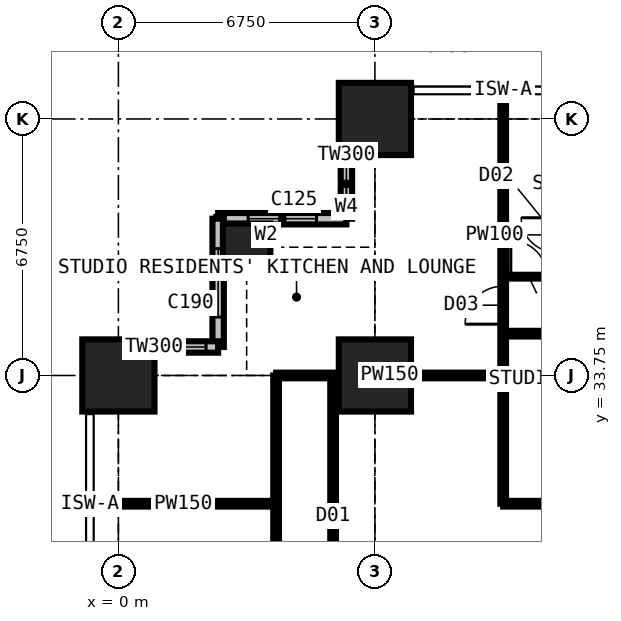
"""IFC4 building model, lengths in metres.
Left out: names, types, materials, properties, quantities, classifications, styles, units other than length and angle.
Written with IfcOpenShell. Run it as: python <this file> out.ifc"""

import sys

from ifc_helpers import new_model, si_unit, direction, frame, frame_2d, origin, origin_2d, place, context, subcontext, project, spatial, rectangle, extrude, element, fill, save


model = new_model("IFC4")
c1 = context("Model", 3, precision=1e-05, world=origin(), true_north=direction((0.0, 1.0)))
c2 = subcontext(c1, "Body", "Model", "MODEL_VIEW")
j1 = project(units=[si_unit("LENGTHUNIT", "METRE"), si_unit("PLANEANGLEUNIT", "RADIAN")], contexts=[c1])
p1 = place(None, origin())
s1 = spatial("IfcSite", under=j1, at=p1, CompositionType="ELEMENT")
p2 = place(p1, origin())
s2 = spatial("IfcBuilding", under=s1, at=p2, CompositionType="ELEMENT")
p3 = place(p2, frame((0.0, 0.0, 39.6)))
s3 = spatial("IfcBuildingStorey", under=s2, at=p3, CompositionType="ELEMENT", Elevation=39.6)
p4 = place(p3, frame((0.0, 33.75, 0.0), z_axis=(0.0, 0.0, 1.0), x_axis=(1.0, 0.0, 0.0)))
e1 = element("IfcColumn", 1, at=p4, inside=s3, PredefinedType="COLUMN", context=c2, shape_type="SweptSolid", body=[
    extrude(rectangle(XDim=1.9, YDim=1.9, at=origin_2d()), origin(), (0.0, 0.0, 1.0), 3.6),
])
p5 = place(p3, frame((3.375, 37.125, 0.0), z_axis=(0.0, 0.0, 1.0), x_axis=(1.0, 0.0, 0.0)))
e2 = element("IfcColumn", 2, at=p5, inside=s3, PredefinedType="COLUMN", context=c2, shape_type="SweptSolid", body=[
    extrude(rectangle(XDim=1.25, YDim=1.25, at=origin_2d()), origin(), (0.0, 0.0, 1.0), 3.6),
])
for number, where, z_axis, x_axis in (
    (3, (6.75, 33.75, 0.0), (0.0, 0.0, 1.0), (1.0, 0.0, 0.0)),
    (4, (6.75, 40.5, 0.0), (0.0, 0.0, 1.0), (1.0, 0.0, 0.0)),
):
    element("IfcColumn", number, at=place(p3, frame(where, z_axis=z_axis, x_axis=x_axis)), inside=s3, PredefinedType="COLUMN", context=c2, shape_type="SweptSolid", body=[
        extrude(rectangle(XDim=1.9, YDim=1.9, at=origin_2d()), origin(), (0.0, 0.0, 1.0), 3.6),
    ])
p6 = place(p3, frame((6.0, 41.25, 0.0), z_axis=(0.0, 0.0, 1.0), x_axis=(0.0, -1.0, 0.0)))
e5 = element("IfcWall", 5, at=p6, inside=s3, PredefinedType="SOLIDWALL", context=c2, shape_type="SweptSolid", body=[
    extrude(rectangle(XDim=3.375, YDim=0.3, at=frame_2d((1.688, 0.0))), origin(), (0.0, 0.0, 1.0), 3.375),
])
p7 = place(p6, frame((1.857, 0.0, 0.9)))
e6 = element("IfcOpeningElement", 6, at=p7, cuts=e5, PredefinedType="OPENING", context=c2, shape_type="SweptSolid", body=[
    extrude(rectangle(XDim=1.2, YDim=1.8, at=frame_2d((0.6, 0.9))), frame((0.0, 0.16, 0.0), z_axis=(0.0, -1.0, 0.0), x_axis=(1.0, 0.0, 0.0)), (0.0, 0.0, 1.0), 0.32),
])
p8 = place(p3, frame((6.0, 37.875, 0.0), z_axis=(0.0, 0.0, 1.0), x_axis=(-1.0, 0.0, 0.0)))
e7 = element("IfcWall", 7, at=p8, inside=s3, PredefinedType="SOLIDWALL", context=c2, shape_type="SweptSolid", body=[
    extrude(rectangle(XDim=3.375, YDim=0.3, at=frame_2d((1.688, 0.0))), origin(), (0.0, 0.0, 1.0), 3.375),
])
p9 = place(p8, frame((0.788, 0.0, 0.6)))
e8 = element("IfcOpeningElement", 8, at=p9, cuts=e7, PredefinedType="OPENING", context=c2, shape_type="SweptSolid", body=[
    extrude(rectangle(XDim=1.8, YDim=2.1, at=frame_2d((0.9, 1.05))), frame((0.0, 0.16, 0.0), z_axis=(0.0, -1.0, 0.0), x_axis=(1.0, 0.0, 0.0)), (0.0, 0.0, 1.0), 0.32),
])
p10 = place(p3, frame((2.625, 37.875, 0.0), z_axis=(0.0, 0.0, 1.0), x_axis=(0.0, -1.0, 0.0)))
e9 = element("IfcWall", 9, at=p10, inside=s3, PredefinedType="SOLIDWALL", context=c2, shape_type="SweptSolid", body=[
    extrude(rectangle(XDim=3.375, YDim=0.3, at=frame_2d((1.688, 0.0))), origin(), (0.0, 0.0, 1.0), 3.375),
])
p11 = place(p10, frame((0.788, 0.0, 0.6)))
e10 = element("IfcOpeningElement", 10, at=p11, cuts=e9, PredefinedType="OPENING", context=c2, shape_type="SweptSolid", body=[
    extrude(rectangle(XDim=1.8, YDim=2.1, at=frame_2d((0.9, 1.05))), frame((0.0, 0.16, 0.0), z_axis=(0.0, -1.0, 0.0), x_axis=(1.0, 0.0, 0.0)), (0.0, 0.0, 1.0), 0.32),
])
p12 = place(p3, frame((2.625, 34.5, 0.0), z_axis=(0.0, 0.0, 1.0), x_axis=(-1.0, 0.0, 0.0)))
e11 = element("IfcWall", 11, at=p12, inside=s3, PredefinedType="SOLIDWALL", context=c2, shape_type="SweptSolid", body=[
    extrude(rectangle(XDim=3.375, YDim=0.3, at=frame_2d((1.688, 0.0))), origin(), (0.0, 0.0, 1.0), 3.375),
])
p13 = place(p12, frame((0.317, 0.0, 0.9)))
e12 = element("IfcOpeningElement", 12, at=p13, cuts=e11, PredefinedType="OPENING", context=c2, shape_type="SweptSolid", body=[
    extrude(rectangle(XDim=1.2, YDim=1.8, at=frame_2d((0.6, 0.9))), frame((0.0, 0.16, 0.0), z_axis=(0.0, -1.0, 0.0), x_axis=(1.0, 0.0, 0.0)), (0.0, 0.0, 1.0), 0.32),
])
p14 = place(p3, frame((-0.734, 30.375, 0.0), z_axis=(0.0, 0.0, 1.0), x_axis=(1.0, 0.0, 0.0)))
e13 = element("IfcWall", 13, at=p14, inside=s3, PredefinedType="PARTITIONING", context=c2, shape_type="SweptSolid", body=[
    extrude(rectangle(XDim=4.884, YDim=0.15, at=frame_2d((2.442, 0.0))), origin(), (0.0, 0.0, 1.0), 3.375),
])
p15 = place(p3, frame((4.15, 10.125, 0.0), z_axis=(0.0, 0.0, 1.0), x_axis=(0.0, 1.0, 0.0)))
e14 = element("IfcWall", 14, at=p15, inside=s3, PredefinedType="PARTITIONING", context=c2, shape_type="SweptSolid", body=[
    extrude(rectangle(XDim=23.625, YDim=0.15, at=frame_2d((11.812, 0.0))), origin(), (0.0, 0.0, 1.0), 3.375),
])
p16 = place(p15, frame((4.2, 0.0, 0.0)))
e15 = element("IfcOpeningElement", 15, at=p16, cuts=e14, PredefinedType="OPENING", context=c2, shape_type="SweptSolid", body=[
    extrude(rectangle(XDim=0.95, YDim=2.2, at=frame_2d((0.475, 1.1))), frame((0.0, 0.085, 0.0), z_axis=(0.0, -1.0, 0.0), x_axis=(1.0, 0.0, 0.0)), (0.0, 0.0, 1.0), 0.17),
])
p17 = place(p15, frame((10.95, 0.0, 0.0)))
e16 = element("IfcOpeningElement", 16, at=p17, cuts=e14, PredefinedType="OPENING", context=c2, shape_type="SweptSolid", body=[
    extrude(rectangle(XDim=0.95, YDim=2.2, at=frame_2d((0.475, 1.1))), frame((0.0, 0.085, 0.0), z_axis=(0.0, -1.0, 0.0), x_axis=(1.0, 0.0, 0.0)), (0.0, 0.0, 1.0), 0.17),
])
p18 = place(p15, frame((17.7, 0.0, 0.0)))
e17 = element("IfcOpeningElement", 17, at=p18, cuts=e14, PredefinedType="OPENING", context=c2, shape_type="SweptSolid", body=[
    extrude(rectangle(XDim=0.95, YDim=2.2, at=frame_2d((0.475, 1.1))), frame((0.0, 0.085, 0.0), z_axis=(0.0, -1.0, 0.0), x_axis=(1.0, 0.0, 0.0)), (0.0, 0.0, 1.0), 0.17),
])
p19 = place(p3, frame((4.15, 33.75, 0.0), z_axis=(0.0, 0.0, 1.0), x_axis=(1.0, 0.0, 0.0)))
e18 = element("IfcWall", 18, at=p19, inside=s3, PredefinedType="PARTITIONING", context=c2, shape_type="SweptSolid", body=[
    extrude(rectangle(XDim=5.975, YDim=0.15, at=frame_2d((2.988, 0.0))), origin(), (0.0, 0.0, 1.0), 2.877),
])
p20 = place(p3, frame((5.65, 22.988, 0.0), z_axis=(0.0, 0.0, 1.0), x_axis=(0.0, 1.0, 0.0)))
e19 = element("IfcWall", 19, at=p20, inside=s3, PredefinedType="PARTITIONING", context=c2, shape_type="SweptSolid", body=[
    extrude(rectangle(XDim=10.762, YDim=0.15, at=frame_2d((5.381, 0.0))), origin(), (0.0, 0.0, 1.0), 3.375),
])
p21 = place(p20, frame((5.0, 0.0, 0.0)))
e20 = element("IfcOpeningElement", 20, at=p21, cuts=e19, PredefinedType="OPENING", context=c2, shape_type="SweptSolid", body=[
    extrude(rectangle(XDim=0.95, YDim=2.2, at=frame_2d((0.475, 1.1))), frame((0.0, 0.085, 0.0), z_axis=(0.0, -1.0, 0.0), x_axis=(1.0, 0.0, 0.0)), (0.0, 0.0, 1.0), 0.17),
])
p22 = place(p3, frame((10.125, 30.375, 0.0), z_axis=(0.0, 0.0, 1.0), x_axis=(0.0, 1.0, 0.0)))
e21 = element("IfcWall", 21, at=p22, inside=s3, PredefinedType="PARTITIONING", context=c2, shape_type="SweptSolid", body=[
    extrude(rectangle(XDim=10.859, YDim=0.15, at=frame_2d((5.429, 0.0))), origin(), (0.0, 0.0, 1.0), 3.375),
])
p23 = place(p22, frame((4.725, 0.0, 0.0)))
e22 = element("IfcOpeningElement", 22, at=p23, cuts=e21, PredefinedType="OPENING", context=c2, shape_type="SweptSolid", body=[
    extrude(rectangle(XDim=1.0, YDim=2.2, at=frame_2d((0.5, 1.1))), frame((0.0, 0.085, 0.0), z_axis=(0.0, -1.0, 0.0), x_axis=(1.0, 0.0, 0.0)), (0.0, 0.0, 1.0), 0.17),
])
p24 = place(p3, frame((10.125, 30.375, 0.0), z_axis=(0.0, 0.0, 1.0), x_axis=(1.0, 0.0, 0.0)))
e23 = element("IfcWall", 23, at=p24, inside=s3, PredefinedType="PARTITIONING", context=c2, shape_type="SweptSolid", body=[
    extrude(rectangle(XDim=1.175, YDim=0.15, at=frame_2d((0.587, 0.0))), origin(), (0.0, 0.0, 1.0), 3.375),
])
p25 = place(p3, frame((10.125, 34.85, 0.0), z_axis=(0.0, 0.0, 1.0), x_axis=(1.0, 0.0, 0.0)))
e24 = element("IfcWall", 24, at=p25, inside=s3, PredefinedType="PARTITIONING", context=c2, shape_type="SweptSolid", body=[
    extrude(rectangle(XDim=10.762, YDim=0.15, at=frame_2d((5.381, 0.0))), origin(), (0.0, 0.0, 1.0), 3.375),
])
p26 = place(p25, frame((4.9, 0.0, 0.0)))
e25 = element("IfcOpeningElement", 25, at=p26, cuts=e24, PredefinedType="OPENING", context=c2, shape_type="SweptSolid", body=[
    extrude(rectangle(XDim=0.95, YDim=2.2, at=frame_2d((0.475, 1.1))), frame((0.0, 0.085, 0.0), z_axis=(0.0, -1.0, 0.0), x_axis=(1.0, 0.0, 0.0)), (0.0, 0.0, 1.0), 0.17),
])
p27 = place(p3, frame((10.125, 36.35, 0.0), z_axis=(0.0, 0.0, 1.0), x_axis=(1.0, 0.0, 0.0)))
e26 = element("IfcWall", 26, at=p27, inside=s3, PredefinedType="PARTITIONING", context=c2, shape_type="SweptSolid", body=[
    extrude(rectangle(XDim=23.625, YDim=0.1, at=frame_2d((11.812, 0.0))), origin(), (0.0, 0.0, 1.0), 3.375),
])
p28 = place(p27, frame((0.2, 0.0, 0.0)))
e27 = element("IfcOpeningElement", 27, at=p28, cuts=e26, PredefinedType="OPENING", context=c2, shape_type="SweptSolid", body=[
    extrude(rectangle(XDim=0.95, YDim=2.2, at=frame_2d((0.475, 1.1))), frame((0.0, 0.06, 0.0), z_axis=(0.0, -1.0, 0.0), x_axis=(1.0, 0.0, 0.0)), (0.0, 0.0, 1.0), 0.12),
])
p29 = place(p27, frame((3.625, 0.0, 0.0)))
e28 = element("IfcOpeningElement", 28, at=p29, cuts=e26, PredefinedType="OPENING", context=c2, shape_type="SweptSolid", body=[
    extrude(rectangle(XDim=0.95, YDim=2.2, at=frame_2d((0.475, 1.1))), frame((0.0, 0.06, 0.0), z_axis=(0.0, -1.0, 0.0), x_axis=(1.0, 0.0, 0.0)), (0.0, 0.0, 1.0), 0.12),
])
p30 = place(p27, frame((7.0, 0.0, 0.0)))
e29 = element("IfcOpeningElement", 29, at=p30, cuts=e26, PredefinedType="OPENING", context=c2, shape_type="SweptSolid", body=[
    extrude(rectangle(XDim=0.95, YDim=2.2, at=frame_2d((0.475, 1.1))), frame((0.0, 0.06, 0.0), z_axis=(0.0, -1.0, 0.0), x_axis=(1.0, 0.0, 0.0)), (0.0, 0.0, 1.0), 0.12),
])
p31 = place(p27, frame((10.375, 0.0, 0.0)))
e30 = element("IfcOpeningElement", 30, at=p31, cuts=e26, PredefinedType="OPENING", context=c2, shape_type="SweptSolid", body=[
    extrude(rectangle(XDim=0.95, YDim=2.2, at=frame_2d((0.475, 1.1))), frame((0.0, 0.06, 0.0), z_axis=(0.0, -1.0, 0.0), x_axis=(1.0, 0.0, 0.0)), (0.0, 0.0, 1.0), 0.12),
])
p32 = place(p27, frame((13.75, 0.0, 0.0)))
e31 = element("IfcOpeningElement", 31, at=p32, cuts=e26, PredefinedType="OPENING", context=c2, shape_type="SweptSolid", body=[
    extrude(rectangle(XDim=0.95, YDim=2.2, at=frame_2d((0.475, 1.1))), frame((0.0, 0.06, 0.0), z_axis=(0.0, -1.0, 0.0), x_axis=(1.0, 0.0, 0.0)), (0.0, 0.0, 1.0), 0.12),
])
p33 = place(p7, origin())
e32 = element("IfcWindow", 32, at=p33, inside=s3, PartitioningType="SINGLE_PANEL", PredefinedType="WINDOW", context=c2, shape_type="SweptSolid", body=[
    extrude(rectangle(XDim=1.2, YDim=1.8, at=frame_2d((0.6, 0.9))), frame((0.0, 0.03, 0.0), z_axis=(0.0, -1.0, 0.0), x_axis=(1.0, 0.0, 0.0)), (0.0, 0.0, 1.0), 0.06),
])
fill(e6, e32)
p34 = place(p9, origin())
e33 = element("IfcWindow", 33, at=p34, inside=s3, PartitioningType="SINGLE_PANEL", PredefinedType="WINDOW", context=c2, shape_type="SweptSolid", body=[
    extrude(rectangle(XDim=1.8, YDim=2.1, at=frame_2d((0.9, 1.05))), frame((0.0, 0.03, 0.0), z_axis=(0.0, -1.0, 0.0), x_axis=(1.0, 0.0, 0.0)), (0.0, 0.0, 1.0), 0.06),
])
fill(e8, e33)
p35 = place(p11, origin())
e34 = element("IfcWindow", 34, at=p35, inside=s3, PartitioningType="SINGLE_PANEL", PredefinedType="WINDOW", context=c2, shape_type="SweptSolid", body=[
    extrude(rectangle(XDim=1.8, YDim=2.1, at=frame_2d((0.9, 1.05))), frame((0.0, 0.03, 0.0), z_axis=(0.0, -1.0, 0.0), x_axis=(1.0, 0.0, 0.0)), (0.0, 0.0, 1.0), 0.06),
])
fill(e10, e34)
p36 = place(p13, origin())
e35 = element("IfcWindow", 35, at=p36, inside=s3, PartitioningType="SINGLE_PANEL", PredefinedType="WINDOW", context=c2, shape_type="SweptSolid", body=[
    extrude(rectangle(XDim=1.2, YDim=1.8, at=frame_2d((0.6, 0.9))), frame((0.0, 0.03, 0.0), z_axis=(0.0, -1.0, 0.0), x_axis=(1.0, 0.0, 0.0)), (0.0, 0.0, 1.0), 0.06),
])
fill(e12, e35)
p37 = place(p28, origin())
e36 = element("IfcDoor", 36, at=p37, inside=s3, OperationType="SINGLE_SWING_LEFT", PredefinedType="DOOR", context=c2, shape_type="SweptSolid", body=[
    extrude(rectangle(XDim=0.95, YDim=2.2, at=frame_2d((0.475, 1.1))), frame((0.0, 0.025, 0.0), z_axis=(0.0, -1.0, 0.0), x_axis=(1.0, 0.0, 0.0)), (0.0, 0.0, 1.0), 0.05),
])
fill(e27, e36)
p38 = place(p23, origin())
e37 = element("IfcDoor", 37, at=p38, inside=s3, OperationType="SINGLE_SWING_LEFT", PredefinedType="DOOR", context=c2, shape_type="SweptSolid", body=[
    extrude(rectangle(XDim=1.0, YDim=2.2, at=frame_2d((0.5, 1.1))), frame((0.0, 0.025, 0.0), z_axis=(0.0, -1.0, 0.0), x_axis=(1.0, 0.0, 0.0)), (0.0, 0.0, 1.0), 0.05),
])
fill(e22, e37)
save(model, sys.argv[1])
